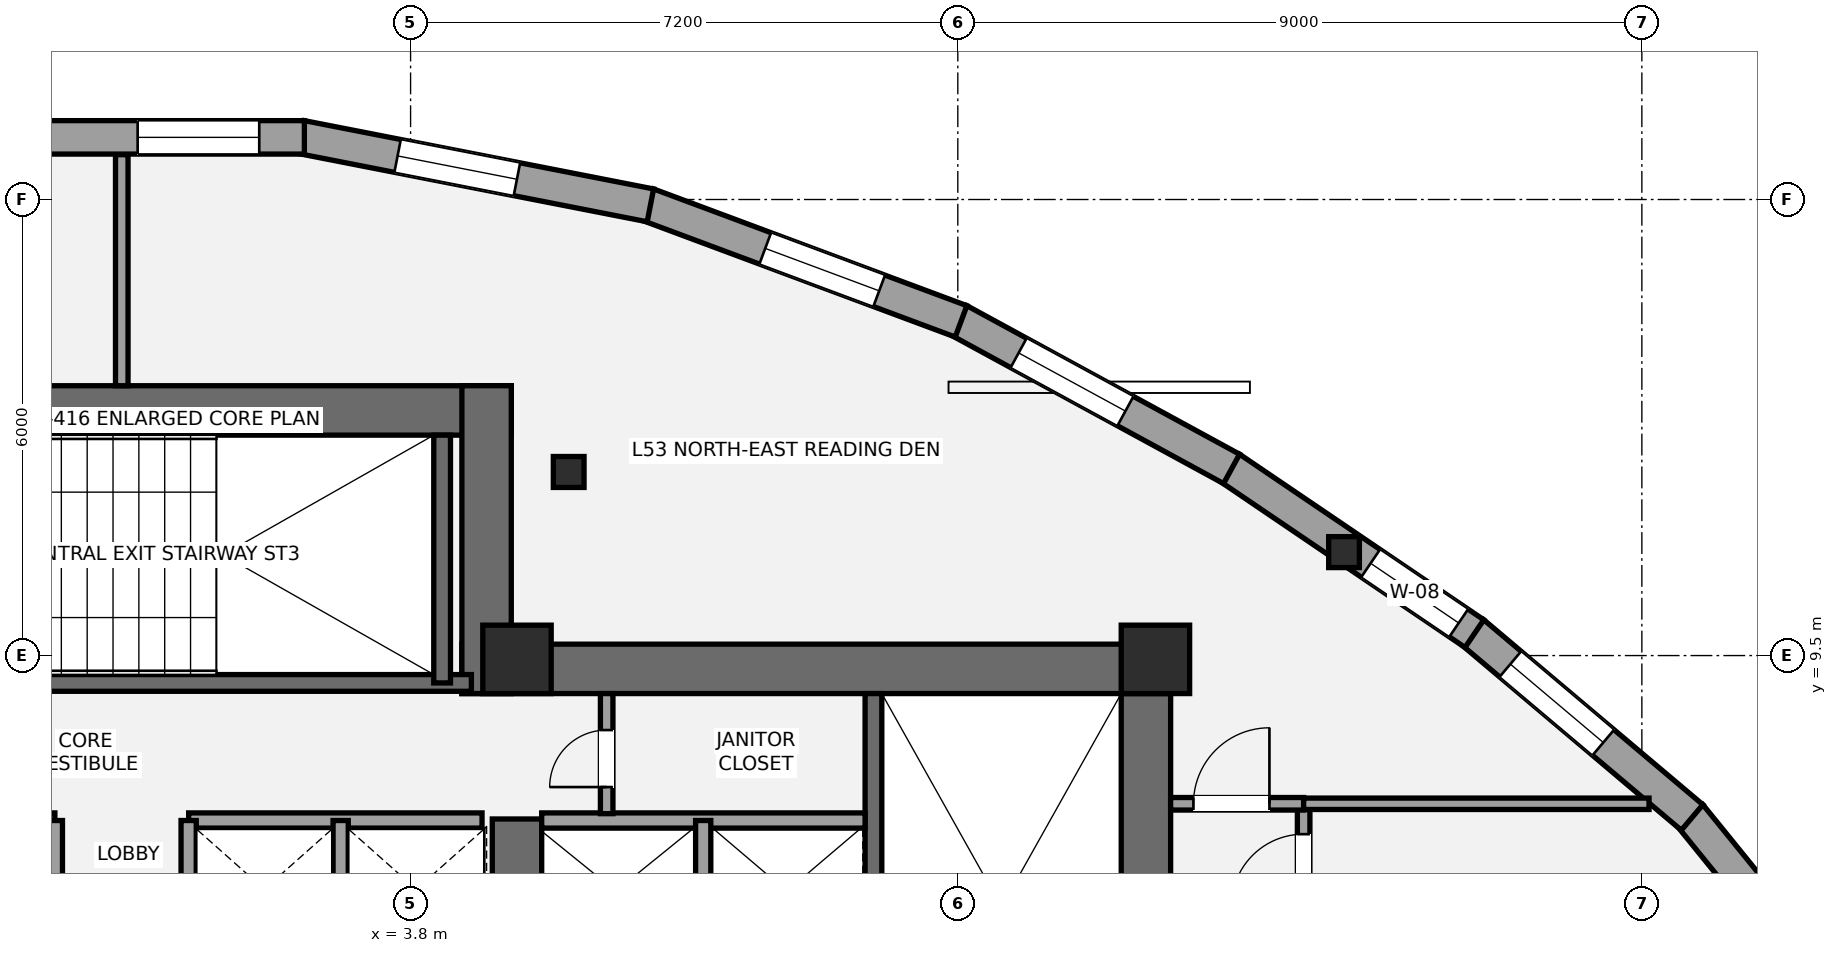
"""IFC4 building model, lengths in metres.
Left out: names, types, materials, properties, quantities, classifications, styles, units other than length and angle.
Written with IfcOpenShell. Run it as: python <this file> out.ifc"""

import sys

from ifc_helpers import new_model, si_unit, direction, frame, frame_2d, origin, origin_2d, place, context, subcontext, project, spatial, rectangle, i_section, extrude, element, fill, save


model = new_model("IFC4")
c1 = context("Model", 3, precision=1e-05, world=origin(), true_north=direction((0.0, 1.0)))
c2 = subcontext(c1, "Body", "Model", "MODEL_VIEW")
j1 = project(units=[si_unit("LENGTHUNIT", "METRE"), si_unit("PLANEANGLEUNIT", "RADIAN")], contexts=[c1])
p1 = place(None, origin())
s1 = spatial("IfcSite", under=j1, at=p1, CompositionType="ELEMENT")
p2 = place(p1, origin())
s2 = spatial("IfcBuilding", under=s1, at=p2, CompositionType="ELEMENT")
p3 = place(p2, frame((0.0, 0.0, 191.8)))
s3 = spatial("IfcBuildingStorey", under=s2, at=p3, CompositionType="ELEMENT", Elevation=191.8)
p4 = place(p3, frame((13.475, 1.2, 0.0), z_axis=(0.0, 0.0, 1.0), x_axis=(0.0, 1.0, 0.0)))
e1 = element("IfcWall", 1, at=p4, inside=s3, PredefinedType="SHEAR", context=c2, shape_type="SweptSolid", body=[
    extrude(rectangle(XDim=8.45, YDim=0.65, at=frame_2d((4.225, 0.0))), origin(), (0.0, 0.0, 1.0), 3.2),
])
p5 = place(p3, frame((4.475, 9.325, 0.0), z_axis=(0.0, 0.0, 1.0), x_axis=(1.0, 0.0, 0.0)))
e2 = element("IfcWall", 2, at=p5, inside=s3, PredefinedType="SHEAR", context=c2, shape_type="SweptSolid", body=[
    extrude(rectangle(XDim=9.325, YDim=0.65, at=frame_2d((4.663, 0.0))), origin(), (0.0, 0.0, 1.0), 3.2),
])
p6 = place(p3, frame((5.2, 5.35, 0.0), z_axis=(0.0, 0.0, 1.0), x_axis=(0.0, 1.0, 0.0)))
e3 = element("IfcWall", 3, at=p6, inside=s3, PredefinedType="SHEAR", context=c2, shape_type="SweptSolid", body=[
    extrude(rectangle(XDim=2.0, YDim=0.65, at=frame_2d((1.0, 0.0))), origin(), (0.0, 0.0, 1.0), 3.2),
])
p7 = place(p3, frame((9.89, 1.85, 0.0), z_axis=(0.0, 0.0, 1.0), x_axis=(0.0, 1.0, 0.0)))
e4 = element("IfcWall", 4, at=p7, inside=s3, PredefinedType="SHEAR", context=c2, shape_type="SweptSolid", body=[
    extrude(rectangle(XDim=7.15, YDim=0.22, at=frame_2d((3.575, 0.0))), origin(), (0.0, 0.0, 1.0), 3.2),
])
p8 = place(p3, frame((-5.125, 12.725, 0.0), z_axis=(0.0, 0.0, 1.0), x_axis=(1.0, 0.0, 0.0)))
e5 = element("IfcWall", 5, at=p8, inside=s3, PredefinedType="SHEAR", context=c2, shape_type="SweptSolid", body=[
    extrude(rectangle(XDim=10.25, YDim=0.65, at=frame_2d((5.125, 0.0))), origin(), (0.0, 0.0, 1.0), 3.2),
])
p9 = place(p3, frame((4.8, 9.0, 0.0), z_axis=(0.0, 0.0, 1.0), x_axis=(0.0, 1.0, 0.0)))
e6 = element("IfcWall", 6, at=p9, inside=s3, PredefinedType="SHEAR", context=c2, shape_type="SweptSolid", body=[
    extrude(rectangle(XDim=4.05, YDim=0.65, at=frame_2d((2.025, 0.0))), origin(), (0.0, 0.0, 1.0), 3.2),
])
p10 = place(p3, frame((-4.7, 9.14, 0.0), z_axis=(0.0, 0.0, 1.0), x_axis=(1.0, 0.0, 0.0)))
e7 = element("IfcWall", 7, at=p10, inside=s3, PredefinedType="SHEAR", context=c2, shape_type="SweptSolid", body=[
    extrude(rectangle(XDim=9.3, YDim=0.22, at=frame_2d((4.65, 0.0))), origin(), (0.0, 0.0, 1.0), 3.2),
])
p11 = place(p10, frame((1.15, 0.0, 0.0)))
e8 = element("IfcOpeningElement", 8, at=p11, cuts=e7, PredefinedType="OPENING", context=c2, shape_type="SweptSolid", body=[
    extrude(rectangle(XDim=1.05, YDim=2.15, at=frame_2d((0.525, 1.075))), frame((0.0, 0.12, 0.0), z_axis=(0.0, -1.0, 0.0), x_axis=(1.0, 0.0, 0.0)), (0.0, 0.0, 1.0), 0.24),
])
p12 = place(p3, frame((4.215, 9.14, 0.0), z_axis=(0.0, 0.0, 1.0), x_axis=(0.0, 1.0, 0.0)))
e9 = element("IfcWall", 9, at=p12, inside=s3, PredefinedType="SHEAR", context=c2, shape_type="SweptSolid", body=[
    extrude(rectangle(XDim=3.26, YDim=0.22, at=frame_2d((1.63, 0.0))), origin(), (0.0, 0.0, 1.0), 3.2),
])
for number, where, z_axis, x_axis in (
    (10, (5.2, 9.45, 0.0), (0.0, 0.0, 1.0), (1.0, 0.0, 0.0)),
    (11, (13.6, 9.45, 0.0), (0.0, 0.0, 1.0), (1.0, 0.0, 0.0)),
):
    element("IfcColumn", number, at=place(p3, frame(where, z_axis=z_axis, x_axis=x_axis)), inside=s3, PredefinedType="COLUMN", context=c2, shape_type="SweptSolid", body=[
        extrude(rectangle(XDim=0.9, YDim=0.9, at=origin_2d()), origin(), (0.0, 0.0, 1.0), 3.2),
    ])
for number, where, z_axis, x_axis in (
    (12, (16.082, 10.861, 0.0), (0.0, 0.0, 1.0), (1.0, 0.0, 0.0)),
    (13, (5.88, 11.915, 0.0), (0.0, 0.0, 1.0), (1.0, 0.0, 0.0)),
):
    element("IfcColumn", number, at=place(p3, frame(where, z_axis=z_axis, x_axis=x_axis)), inside=s3, PredefinedType="COLUMN", context=c2, shape_type="SweptSolid", body=[
        extrude(i_section(OverallWidth=0.404, OverallDepth=0.407, WebThickness=0.027, FlangeThickness=0.044, at=origin_2d()), origin(), (0.0, 0.0, 1.0), 3.2),
    ])
p13 = place(p3, frame((20.632, 7.4, 0.0), z_axis=(0.0, 0.0, 1.0), x_axis=(0.629697919329, -0.776840093193, 0.0)))
e14 = element("IfcWall", 14, at=p13, inside=s3, PredefinedType="STANDARD", context=c2, shape_type="SweptSolid", body=[
    extrude(rectangle(XDim=3.597, YDim=0.44, at=frame_2d((1.799, 0.0))), origin(), (0.0, 0.0, 1.0), 2.315),
])
p14 = place(p13, frame((1.448, 0.0, 0.58)))
e15 = element("IfcOpeningElement", 15, at=p14, cuts=e14, PredefinedType="OPENING", context=c2, shape_type="SweptSolid", body=[
    extrude(rectangle(XDim=1.6, YDim=1.55, at=frame_2d((0.8, 0.775))), frame((0.0, 0.23, 0.0), z_axis=(0.0, -1.0, 0.0), x_axis=(1.0, 0.0, 0.0)), (0.0, 0.0, 1.0), 0.46),
])
p15 = place(p3, frame((17.779, 9.802, 0.0), z_axis=(0.0, 0.0, 1.0), x_axis=(0.764269547527, -0.644896936512, 0.0)))
e16 = element("IfcWall", 16, at=p15, inside=s3, PredefinedType="STANDARD", context=c2, shape_type="SweptSolid", body=[
    extrude(rectangle(XDim=3.771, YDim=0.44, at=frame_2d((1.886, 0.0))), origin(), (0.0, 0.0, 1.0), 2.315),
])
p16 = place(p15, frame((0.643, 0.0, 0.58)))
e17 = element("IfcOpeningElement", 17, at=p16, cuts=e16, PredefinedType="OPENING", context=c2, shape_type="SweptSolid", body=[
    extrude(rectangle(XDim=1.6, YDim=1.55, at=frame_2d((0.8, 0.775))), frame((0.0, 0.23, 0.0), z_axis=(0.0, -1.0, 0.0), x_axis=(1.0, 0.0, 0.0)), (0.0, 0.0, 1.0), 0.46),
])
p17 = place(p3, frame((14.583, 11.967, 0.0), z_axis=(0.0, 0.0, 1.0), x_axis=(0.827690675663, -0.561184591218, 0.0)))
e18 = element("IfcWall", 18, at=p17, inside=s3, PredefinedType="STANDARD", context=c2, shape_type="SweptSolid", body=[
    extrude(rectangle(XDim=3.882, YDim=0.44, at=frame_2d((1.941, 0.0))), origin(), (0.0, 0.0, 1.0), 2.315),
])
p18 = place(p17, frame((2.233, 0.0, 0.58)))
e19 = element("IfcOpeningElement", 19, at=p18, cuts=e18, PredefinedType="OPENING", context=c2, shape_type="SweptSolid", body=[
    extrude(rectangle(XDim=1.4, YDim=1.55, at=frame_2d((0.7, 0.775))), frame((0.0, 0.23, 0.0), z_axis=(0.0, -1.0, 0.0), x_axis=(1.0, 0.0, 0.0)), (0.0, 0.0, 1.0), 0.46),
])
p19 = place(p3, frame((11.014, 13.91, 0.0), z_axis=(0.0, 0.0, 1.0), x_axis=(0.878158075839, -0.478370561217, 0.0)))
e20 = element("IfcWall", 20, at=p19, inside=s3, PredefinedType="STANDARD", context=c2, shape_type="SweptSolid", body=[
    extrude(rectangle(XDim=4.085, YDim=0.44, at=frame_2d((2.043, 0.0))), origin(), (0.0, 0.0, 1.0), 2.315),
])
p20 = place(p19, frame((0.895, 0.0, 0.58)))
e21 = element("IfcOpeningElement", 21, at=p20, cuts=e20, PredefinedType="OPENING", context=c2, shape_type="SweptSolid", body=[
    extrude(rectangle(XDim=1.6, YDim=1.55, at=frame_2d((0.8, 0.775))), frame((0.0, 0.23, 0.0), z_axis=(0.0, -1.0, 0.0), x_axis=(1.0, 0.0, 0.0)), (0.0, 0.0, 1.0), 0.46),
])
p21 = place(p3, frame((6.921, 15.433, 0.0), z_axis=(0.0, 0.0, 1.0), x_axis=(0.937088879832, -0.349090863953, 0.0)))
e22 = element("IfcWall", 22, at=p21, inside=s3, PredefinedType="STANDARD", context=c2, shape_type="SweptSolid", body=[
    extrude(rectangle(XDim=4.398, YDim=0.44, at=frame_2d((2.199, 0.0))), origin(), (0.0, 0.0, 1.0), 2.315),
])
p22 = place(p21, frame((1.649, 0.0, 0.58)))
e23 = element("IfcOpeningElement", 23, at=p22, cuts=e22, PredefinedType="OPENING", context=c2, shape_type="SweptSolid", body=[
    extrude(rectangle(XDim=1.6, YDim=1.55, at=frame_2d((0.8, 0.775))), frame((0.0, 0.23, 0.0), z_axis=(0.0, -1.0, 0.0), x_axis=(1.0, 0.0, 0.0)), (0.0, 0.0, 1.0), 0.46),
])
p23 = place(p3, frame((2.36, 16.322, 0.0), z_axis=(0.0, 0.0, 1.0), x_axis=(0.981406109785, -0.191942823979, 0.0)))
e24 = element("IfcWall", 24, at=p23, inside=s3, PredefinedType="STANDARD", context=c2, shape_type="SweptSolid", body=[
    extrude(rectangle(XDim=4.682, YDim=0.44, at=frame_2d((2.341, 0.0))), origin(), (0.0, 0.0, 1.0), 2.315),
])
p24 = place(p23, frame((1.293, 0.0, 0.58)))
e25 = element("IfcOpeningElement", 25, at=p24, cuts=e24, PredefinedType="OPENING", context=c2, shape_type="SweptSolid", body=[
    extrude(rectangle(XDim=1.6, YDim=1.55, at=frame_2d((0.8, 0.775))), frame((0.0, 0.23, 0.0), z_axis=(0.0, -1.0, 0.0), x_axis=(1.0, 0.0, 0.0)), (0.0, 0.0, 1.0), 0.46),
])
p25 = place(p3, frame((-2.403, 16.318, 0.0), z_axis=(0.0, 0.0, 1.0), x_axis=(1.0, 0.0, 0.0)))
e26 = element("IfcWall", 26, at=p25, inside=s3, PredefinedType="STANDARD", context=c2, shape_type="SweptSolid", body=[
    extrude(rectangle(XDim=4.805, YDim=0.44, at=frame_2d((2.403, 0.0))), origin(), (0.0, 0.0, 1.0), 2.315),
])
p26 = place(p25, frame((2.612, 0.0, 0.58)))
e27 = element("IfcOpeningElement", 27, at=p26, cuts=e26, PredefinedType="OPENING", context=c2, shape_type="SweptSolid", body=[
    extrude(rectangle(XDim=1.6, YDim=1.55, at=frame_2d((0.8, 0.775))), frame((0.0, 0.23, 0.0), z_axis=(0.0, -1.0, 0.0), x_axis=(1.0, 0.0, 0.0)), (0.0, 0.0, 1.0), 0.46),
])
p27 = place(p3, frame((5.525, 7.33, 0.0), z_axis=(0.0, 0.0, 1.0), x_axis=(1.0, 0.0, 0.0)))
e28 = element("IfcWall", 28, at=p27, inside=s3, PredefinedType="SOLIDWALL", context=c2, shape_type="SweptSolid", body=[
    extrude(rectangle(XDim=4.255, YDim=0.2, at=frame_2d((2.127, 0.0))), origin(), (0.0, 0.0, 1.0), 3.02),
])
p28 = place(p3, frame((7.65, 5.47, 0.0), z_axis=(0.0, 0.0, 1.0), x_axis=(0.0, 1.0, 0.0)))
e29 = element("IfcWall", 29, at=p28, inside=s3, PredefinedType="SOLIDWALL", context=c2, shape_type="SweptSolid", body=[
    extrude(rectangle(XDim=1.86, YDim=0.2, at=frame_2d((0.93, 0.0))), origin(), (0.0, 0.0, 1.0), 3.02),
])
for number, where, z_axis, x_axis in (
    (30, (-4.74, 7.33, 0.0), (0.0, 0.0, 1.0), (1.0, 0.0, 0.0)),
    (31, (0.88, 7.33, 0.0), (0.0, 0.0, 1.0), (1.0, 0.0, 0.0)),
):
    element("IfcWall", number, at=place(p3, frame(where, z_axis=z_axis, x_axis=x_axis)), inside=s3, PredefinedType="SOLIDWALL", context=c2, shape_type="SweptSolid", body=[
        extrude(rectangle(XDim=3.86, YDim=0.2, at=frame_2d((1.93, 0.0))), origin(), (0.0, 0.0, 1.0), 3.02),
    ])
for number, where, z_axis, x_axis in (
    (32, (2.88, 5.52, 0.0), (0.0, 0.0, 1.0), (0.0, 1.0, 0.0)),
    (33, (-0.88, 5.52, 0.0), (0.0, 0.0, 1.0), (0.0, 1.0, 0.0)),
    (34, (0.88, 5.52, 0.0), (0.0, 0.0, 1.0), (0.0, 1.0, 0.0)),
):
    element("IfcWall", number, at=place(p3, frame(where, z_axis=z_axis, x_axis=x_axis)), inside=s3, PredefinedType="SOLIDWALL", context=c2, shape_type="SweptSolid", body=[
        extrude(rectangle(XDim=1.81, YDim=0.2, at=frame_2d((0.905, 0.0))), origin(), (0.0, 0.0, 1.0), 3.02),
    ])
p29 = place(p3, frame((6.38, 7.42, 0.0), z_axis=(0.0, 0.0, 1.0), x_axis=(0.0, 1.0, 0.0)))
e35 = element("IfcWall", 35, at=p29, inside=s3, PredefinedType="PARTITIONING", context=c2, shape_type="SweptSolid", body=[
    extrude(rectangle(XDim=1.58, YDim=0.165, at=frame_2d((0.79, 0.0))), origin(), (0.0, 0.0, 1.0), 3.02),
])
p30 = place(p29, frame((0.35, 0.0, 0.0)))
e36 = element("IfcOpeningElement", 36, at=p30, cuts=e35, PredefinedType="OPENING", context=c2, shape_type="SweptSolid", body=[
    extrude(rectangle(XDim=0.75, YDim=2.1, at=frame_2d((0.375, 1.05))), frame((0.0, 0.093, 0.0), z_axis=(0.0, -1.0, 0.0), x_axis=(1.0, 0.0, 0.0)), (0.0, 0.0, 1.0), 0.185),
])
p31 = place(p3, frame((15.55, -11.036, 0.0), z_axis=(0.0, 0.0, 1.0), x_axis=(0.0, 1.0, 0.0)))
e37 = element("IfcWall", 37, at=p31, inside=s3, PredefinedType="PARTITIONING", context=c2, shape_type="SweptSolid", body=[
    extrude(rectangle(XDim=18.586, YDim=0.165, at=frame_2d((9.293, 0.0))), origin(), (0.0, 0.0, 1.0), 2.473),
])
p32 = place(p31, frame((4.037, 0.0, 0.0)))
e38 = element("IfcOpeningElement", 38, at=p32, cuts=e37, PredefinedType="OPENING", context=c2, shape_type="SweptSolid", body=[
    extrude(rectangle(XDim=0.85, YDim=2.1, at=frame_2d((0.425, 1.05))), frame((0.0, 0.093, 0.0), z_axis=(0.0, -1.0, 0.0), x_axis=(1.0, 0.0, 0.0)), (0.0, 0.0, 1.0), 0.185),
])
p33 = place(p31, frame((8.086, 0.0, 0.0)))
e39 = element("IfcOpeningElement", 39, at=p33, cuts=e37, PredefinedType="OPENING", context=c2, shape_type="SweptSolid", body=[
    extrude(rectangle(XDim=0.95, YDim=2.15, at=frame_2d((0.475, 1.075))), frame((0.0, 0.093, 0.0), z_axis=(0.0, -1.0, 0.0), x_axis=(1.0, 0.0, 0.0)), (0.0, 0.0, 1.0), 0.185),
])
p34 = place(p31, frame((12.487, 0.0, 0.0)))
e40 = element("IfcOpeningElement", 40, at=p34, cuts=e37, PredefinedType="OPENING", context=c2, shape_type="SweptSolid", body=[
    extrude(rectangle(XDim=0.95, YDim=2.15, at=frame_2d((0.475, 1.075))), frame((0.0, 0.093, 0.0), z_axis=(0.0, -1.0, 0.0), x_axis=(1.0, 0.0, 0.0)), (0.0, 0.0, 1.0), 0.185),
])
p35 = place(p31, frame((17.237, 0.0, 0.0)))
e41 = element("IfcOpeningElement", 41, at=p35, cuts=e37, PredefinedType="OPENING", context=c2, shape_type="SweptSolid", body=[
    extrude(rectangle(XDim=0.95, YDim=2.15, at=frame_2d((0.475, 1.075))), frame((0.0, 0.093, 0.0), z_axis=(0.0, -1.0, 0.0), x_axis=(1.0, 0.0, 0.0)), (0.0, 0.0, 1.0), 0.185),
])
p36 = place(p3, frame((13.8, 7.55, 0.0), z_axis=(0.0, 0.0, 1.0), x_axis=(1.0, 0.0, 0.0)))
e42 = element("IfcWall", 42, at=p36, inside=s3, PredefinedType="PARTITIONING", context=c2, shape_type="SweptSolid", body=[
    extrude(rectangle(XDim=1.75, YDim=0.165, at=frame_2d((0.875, 0.0))), origin(), (0.0, 0.0, 1.0), 3.02),
])
p37 = place(p36, frame((0.3, 0.0, 0.0)))
e43 = element("IfcOpeningElement", 43, at=p37, cuts=e42, PredefinedType="OPENING", context=c2, shape_type="SweptSolid", body=[
    extrude(rectangle(XDim=1.0, YDim=2.15, at=frame_2d((0.5, 1.075))), frame((0.0, 0.093, 0.0), z_axis=(0.0, -1.0, 0.0), x_axis=(1.0, 0.0, 0.0)), (0.0, 0.0, 1.0), 0.185),
])
p38 = place(p3, frame((15.55, 7.55, 0.0), z_axis=(0.0, 0.0, 1.0), x_axis=(1.0, 0.0, 0.0)))
e44 = element("IfcWall", 44, at=p38, inside=s3, PredefinedType="PLUMBINGWALL", context=c2, shape_type="SweptSolid", body=[
    extrude(rectangle(XDim=4.544, YDim=0.15, at=frame_2d((2.272, 0.0))), origin(), (0.0, 0.0, 1.0), 3.02),
])
p39 = place(p3, frame((0.0, 13.05, 0.0), z_axis=(0.0, 0.0, 1.0), x_axis=(0.0, 1.0, 0.0)))
e45 = element("IfcWall", 45, at=p39, inside=s3, PredefinedType="PARTITIONING", context=c2, shape_type="SweptSolid", body=[
    extrude(rectangle(XDim=3.04, YDim=0.165, at=frame_2d((1.52, 0.0))), origin(), (0.0, 0.0, 1.0), 3.02),
])
p40 = place(p16, origin())
e46 = element("IfcWindow", 46, at=p40, inside=s3, PartitioningType="SINGLE_PANEL", PredefinedType="WINDOW", context=c2, shape_type="SweptSolid", body=[
    extrude(rectangle(XDim=1.6, YDim=1.55, at=frame_2d((0.8, 0.775))), frame((0.0, -0.01, 0.0), z_axis=(0.0, -1.0, 0.0), x_axis=(1.0, 0.0, 0.0)), (0.0, 0.0, 1.0), 0.06),
])
fill(e17, e46)
p41 = place(p18, origin())
e47 = element("IfcWindow", 47, at=p41, inside=s3, PartitioningType="SINGLE_PANEL", PredefinedType="WINDOW", context=c2, shape_type="SweptSolid", body=[
    extrude(rectangle(XDim=1.4, YDim=1.55, at=frame_2d((0.7, 0.775))), frame((0.0, -0.01, 0.0), z_axis=(0.0, -1.0, 0.0), x_axis=(1.0, 0.0, 0.0)), (0.0, 0.0, 1.0), 0.06),
])
fill(e19, e47)
p42 = place(p20, origin())
e48 = element("IfcWindow", 48, at=p42, inside=s3, PartitioningType="SINGLE_PANEL", PredefinedType="WINDOW", context=c2, shape_type="SweptSolid", body=[
    extrude(rectangle(XDim=1.6, YDim=1.55, at=frame_2d((0.8, 0.775))), frame((0.0, -0.01, 0.0), z_axis=(0.0, -1.0, 0.0), x_axis=(1.0, 0.0, 0.0)), (0.0, 0.0, 1.0), 0.06),
])
fill(e21, e48)
p43 = place(p22, origin())
e49 = element("IfcWindow", 49, at=p43, inside=s3, PartitioningType="SINGLE_PANEL", PredefinedType="WINDOW", context=c2, shape_type="SweptSolid", body=[
    extrude(rectangle(XDim=1.6, YDim=1.55, at=frame_2d((0.8, 0.775))), frame((0.0, -0.01, 0.0), z_axis=(0.0, -1.0, 0.0), x_axis=(1.0, 0.0, 0.0)), (0.0, 0.0, 1.0), 0.06),
])
fill(e23, e49)
p44 = place(p24, origin())
e50 = element("IfcWindow", 50, at=p44, inside=s3, PartitioningType="SINGLE_PANEL", PredefinedType="WINDOW", context=c2, shape_type="SweptSolid", body=[
    extrude(rectangle(XDim=1.6, YDim=1.55, at=frame_2d((0.8, 0.775))), frame((0.0, -0.01, 0.0), z_axis=(0.0, -1.0, 0.0), x_axis=(1.0, 0.0, 0.0)), (0.0, 0.0, 1.0), 0.06),
])
fill(e25, e50)
p45 = place(p26, origin())
e51 = element("IfcWindow", 51, at=p45, inside=s3, PartitioningType="SINGLE_PANEL", PredefinedType="WINDOW", context=c2, shape_type="SweptSolid", body=[
    extrude(rectangle(XDim=1.6, YDim=1.55, at=frame_2d((0.8, 0.775))), frame((0.0, -0.01, 0.0), z_axis=(0.0, -1.0, 0.0), x_axis=(1.0, 0.0, 0.0)), (0.0, 0.0, 1.0), 0.06),
])
fill(e27, e51)
p46 = place(p30, origin())
e52 = element("IfcDoor", 52, at=p46, inside=s3, OperationType="SINGLE_SWING_LEFT", PredefinedType="DOOR", context=c2, shape_type="SweptSolid", body=[
    extrude(rectangle(XDim=0.75, YDim=2.1, at=frame_2d((0.375, 1.05))), frame((0.0, 0.025, 0.0), z_axis=(0.0, -1.0, 0.0), x_axis=(1.0, 0.0, 0.0)), (0.0, 0.0, 1.0), 0.05),
])
fill(e36, e52)
p47 = place(p37, origin())
e53 = element("IfcDoor", 53, at=p47, inside=s3, OperationType="SINGLE_SWING_RIGHT", PredefinedType="DOOR", context=c2, shape_type="SweptSolid", body=[
    extrude(rectangle(XDim=1.0, YDim=2.15, at=frame_2d((0.5, 1.075))), frame((0.0, 0.025, 0.0), z_axis=(0.0, -1.0, 0.0), x_axis=(1.0, 0.0, 0.0)), (0.0, 0.0, 1.0), 0.05),
])
fill(e43, e53)
p48 = place(p35, origin())
e54 = element("IfcDoor", 54, at=p48, inside=s3, OperationType="SINGLE_SWING_LEFT", PredefinedType="DOOR", context=c2, shape_type="SweptSolid", body=[
    extrude(rectangle(XDim=0.95, YDim=2.15, at=frame_2d((0.475, 1.075))), frame((0.0, 0.025, 0.0), z_axis=(0.0, -1.0, 0.0), x_axis=(1.0, 0.0, 0.0)), (0.0, 0.0, 1.0), 0.05),
])
fill(e41, e54)
save(model, sys.argv[1])
